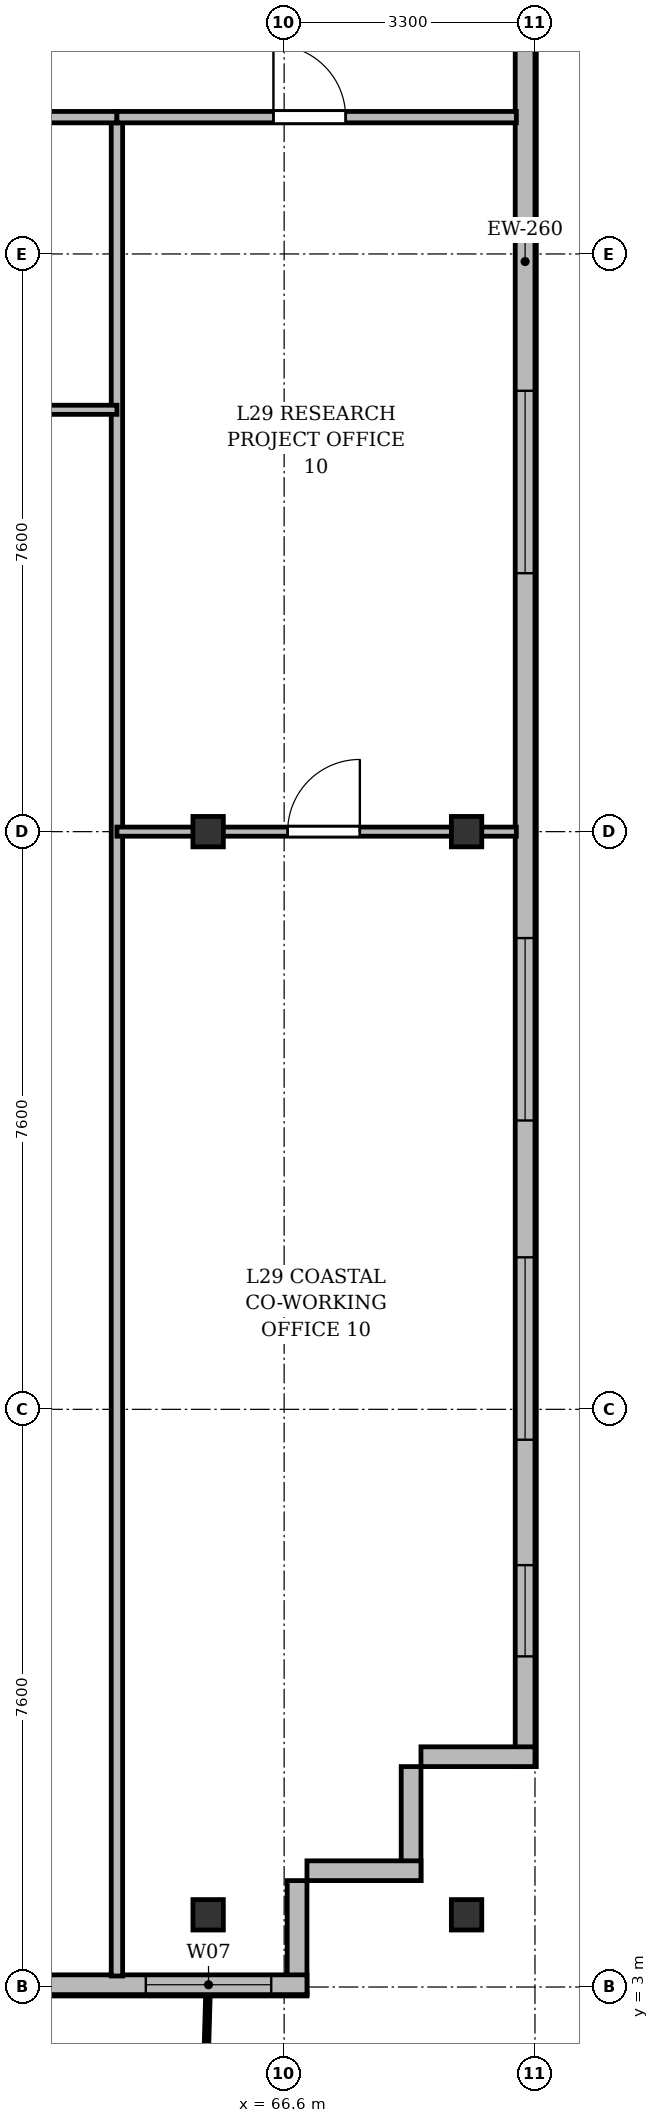
"""IFC4 building model, lengths in metres.
Left out: names, types, materials, properties, quantities, classifications, styles, units other than length and angle.
Written with IfcOpenShell. Run it as: python <this file> out.ifc"""

import sys

from ifc_helpers import new_model, si_unit, direction, frame, frame_2d, origin, origin_2d, place, context, subcontext, project, spatial, rectangle, i_section, extrude, source, transform, mapped, element, fill, save


model = new_model("IFC4")
c1 = context("Model", 3, precision=1e-05, world=origin(), true_north=direction((0.0, 1.0)))
c2 = subcontext(c1, "Body", "Model", "MODEL_VIEW")
j1 = project(units=[si_unit("LENGTHUNIT", "METRE"), si_unit("PLANEANGLEUNIT", "RADIAN")], contexts=[c1])
p1 = place(None, origin())
s1 = spatial("IfcSite", under=j1, at=p1, CompositionType="ELEMENT")
p2 = place(p1, origin())
s2 = spatial("IfcBuilding", under=s1, at=p2, CompositionType="ELEMENT")
p3 = place(p2, frame((0.0, 0.0, 114.1)))
s3 = spatial("IfcBuildingStorey", under=s2, at=p3, CompositionType="ELEMENT", Elevation=114.1)
m1 = source(origin(), c2, "Body", "SweptSolid", [
    extrude(i_section(OverallWidth=0.4, OverallDepth=0.4, WebThickness=0.022, FlangeThickness=0.035, at=origin_2d()), origin(), (0.0, 0.0, 1.0), 3.6),
])
for number, where, z_axis, x_axis in (
    (1, (65.6, 3.95, 0.0), (0.0, 0.0, 1.0), (1.0, 0.0, 0.0)),
    (2, (65.6, 18.2, 0.0), (0.0, 0.0, 1.0), (1.0, 0.0, 0.0)),
    (3, (69.0, 3.95, 0.0), (0.0, 0.0, 1.0), (1.0, 0.0, 0.0)),
    (4, (69.0, 18.2, 0.0), (0.0, 0.0, 1.0), (1.0, 0.0, 0.0)),
):
    element("IfcColumn", number, at=place(p3, frame(where, z_axis=z_axis, x_axis=x_axis)), inside=s3, PredefinedType="COLUMN", context=c2, shape_type="MappedRepresentation", body=[
        mapped(m1, transform((0.0, 0.0, 0.0), x_axis=(1.0, 0.0, 0.0), y_axis=(0.0, 1.0, 0.0), z_axis=(0.0, 0.0, 1.0), scale=1.0)),
    ])
p4 = place(p3, frame((69.77, 45.5, 0.0), z_axis=(0.0, 0.0, 1.0), x_axis=(0.0, -1.0, 0.0)))
e5 = element("IfcWall", 5, at=p4, inside=s3, PredefinedType="SOLIDWALL", context=c2, shape_type="SweptSolid", body=[
    extrude(rectangle(XDim=39.6, YDim=0.26, at=frame_2d((19.8, 0.0))), origin(), (0.0, 0.0, 1.0), 3.34),
])
p5 = place(p4, frame((36.95, 0.0, 0.92)))
e6 = element("IfcOpeningElement", 6, at=p5, cuts=e5, PredefinedType="OPENING", context=c2, shape_type="SweptSolid", body=[
    extrude(rectangle(XDim=1.2, YDim=1.65, at=frame_2d((0.6, 0.825))), frame((0.0, 0.14, 0.0), z_axis=(0.0, -1.0, 0.0), x_axis=(1.0, 0.0, 0.0)), (0.0, 0.0, 1.0), 0.28),
])
p6 = place(p4, frame((32.9, 0.0, 0.92)))
e7 = element("IfcOpeningElement", 7, at=p6, cuts=e5, PredefinedType="OPENING", context=c2, shape_type="SweptSolid", body=[
    extrude(rectangle(XDim=2.4, YDim=2.1, at=frame_2d((1.2, 1.05))), frame((0.0, 0.14, 0.0), z_axis=(0.0, -1.0, 0.0), x_axis=(1.0, 0.0, 0.0)), (0.0, 0.0, 1.0), 0.28),
])
p7 = place(p4, frame((28.7, 0.0, 0.92)))
e8 = element("IfcOpeningElement", 8, at=p7, cuts=e5, PredefinedType="OPENING", context=c2, shape_type="SweptSolid", body=[
    extrude(rectangle(XDim=2.4, YDim=2.1, at=frame_2d((1.2, 1.05))), frame((0.0, 0.14, 0.0), z_axis=(0.0, -1.0, 0.0), x_axis=(1.0, 0.0, 0.0)), (0.0, 0.0, 1.0), 0.28),
])
p8 = place(p4, frame((21.5, 0.0, 0.92)))
e9 = element("IfcOpeningElement", 9, at=p8, cuts=e5, PredefinedType="OPENING", context=c2, shape_type="SweptSolid", body=[
    extrude(rectangle(XDim=2.4, YDim=2.1, at=frame_2d((1.2, 1.05))), frame((0.0, 0.14, 0.0), z_axis=(0.0, -1.0, 0.0), x_axis=(1.0, 0.0, 0.0)), (0.0, 0.0, 1.0), 0.28),
])
p9 = place(p4, frame((7.5, 0.0, 0.92)))
e10 = element("IfcOpeningElement", 10, at=p9, cuts=e5, PredefinedType="OPENING", context=c2, shape_type="SweptSolid", body=[
    extrude(rectangle(XDim=2.4, YDim=2.1, at=frame_2d((1.2, 1.05))), frame((0.0, 0.14, 0.0), z_axis=(0.0, -1.0, 0.0), x_axis=(1.0, 0.0, 0.0)), (0.0, 0.0, 1.0), 0.28),
])
p10 = place(p4, frame((4.5, 0.0, 0.92)))
e11 = element("IfcOpeningElement", 11, at=p10, cuts=e5, PredefinedType="OPENING", context=c2, shape_type="SweptSolid", body=[
    extrude(rectangle(XDim=1.2, YDim=1.65, at=frame_2d((0.6, 0.825))), frame((0.0, 0.14, 0.0), z_axis=(0.0, -1.0, 0.0), x_axis=(1.0, 0.0, 0.0)), (0.0, 0.0, 1.0), 0.28),
])
p11 = place(p4, frame((1.15, 0.0, 0.92)))
e12 = element("IfcOpeningElement", 12, at=p11, cuts=e5, PredefinedType="OPENING", context=c2, shape_type="SweptSolid", body=[
    extrude(rectangle(XDim=1.2, YDim=1.65, at=frame_2d((0.6, 0.825))), frame((0.0, 0.14, 0.0), z_axis=(0.0, -1.0, 0.0), x_axis=(1.0, 0.0, 0.0)), (0.0, 0.0, 1.0), 0.28),
])
p12 = place(p3, frame((69.9, 6.03, 0.0), z_axis=(0.0, 0.0, 1.0), x_axis=(-1.0, 0.0, 0.0)))
e13 = element("IfcWall", 13, at=p12, inside=s3, PredefinedType="SOLIDWALL", context=c2, shape_type="SweptSolid", body=[
    extrude(rectangle(XDim=1.5, YDim=0.26, at=frame_2d((0.75, 0.0))), origin(), (0.0, 0.0, 1.0), 2.84),
])
for number, where, z_axis, x_axis in (
    (14, (68.27, 5.9, 0.0), (0.0, 0.0, 1.0), (0.0, -1.0, 0.0)),
    (15, (68.4, 4.53, 0.0), (0.0, 0.0, 1.0), (-1.0, 0.0, 0.0)),
):
    element("IfcWall", number, at=place(p3, frame(where, z_axis=z_axis, x_axis=x_axis)), inside=s3, PredefinedType="SOLIDWALL", context=c2, shape_type="SweptSolid", body=[
        extrude(rectangle(XDim=1.5, YDim=0.26, at=frame_2d((0.75, 0.0))), origin(), (0.0, 0.0, 1.0), 3.34),
    ])
p13 = place(p3, frame((66.77, 4.4, 0.0), z_axis=(0.0, 0.0, 1.0), x_axis=(0.0, -1.0, 0.0)))
e16 = element("IfcWall", 16, at=p13, inside=s3, PredefinedType="SOLIDWALL", context=c2, shape_type="SweptSolid", body=[
    extrude(rectangle(XDim=1.5, YDim=0.26, at=frame_2d((0.75, 0.0))), origin(), (0.0, 0.0, 1.0), 2.752),
])
p14 = place(p3, frame((66.9, 3.03, 0.0), z_axis=(0.0, 0.0, 1.0), x_axis=(-1.0, 0.0, 0.0)))
e17 = element("IfcWall", 17, at=p14, inside=s3, PredefinedType="SOLIDWALL", context=c2, shape_type="SweptSolid", body=[
    extrude(rectangle(XDim=59.4, YDim=0.26, at=frame_2d((29.7, 0.0))), origin(), (0.0, 0.0, 1.0), 3.34),
])
p15 = place(p14, frame((0.47, 0.0, 0.9)))
e18 = element("IfcOpeningElement", 18, at=p15, cuts=e17, PredefinedType="OPENING", context=c2, shape_type="SweptSolid", body=[
    extrude(rectangle(XDim=1.65, YDim=1.85, at=frame_2d((0.825, 0.925))), frame((0.0, 0.14, 0.0), z_axis=(0.0, -1.0, 0.0), x_axis=(1.0, 0.0, 0.0)), (0.0, 0.0, 1.0), 0.28),
])
p16 = place(p14, frame((4.4, 0.0, 0.9)))
e19 = element("IfcOpeningElement", 19, at=p16, cuts=e17, PredefinedType="OPENING", context=c2, shape_type="SweptSolid", body=[
    extrude(rectangle(XDim=1.8, YDim=1.8, at=frame_2d((0.9, 0.9))), frame((0.0, 0.14, 0.0), z_axis=(0.0, -1.0, 0.0), x_axis=(1.0, 0.0, 0.0)), (0.0, 0.0, 1.0), 0.28),
])
p17 = place(p14, frame((10.9, 0.0, 0.9)))
e20 = element("IfcOpeningElement", 20, at=p17, cuts=e17, PredefinedType="OPENING", context=c2, shape_type="SweptSolid", body=[
    extrude(rectangle(XDim=2.2, YDim=1.8, at=frame_2d((1.1, 0.9))), frame((0.0, 0.14, 0.0), z_axis=(0.0, -1.0, 0.0), x_axis=(1.0, 0.0, 0.0)), (0.0, 0.0, 1.0), 0.28),
])
p18 = place(p14, frame((16.92, 0.0, 0.0)))
e21 = element("IfcOpeningElement", 21, at=p18, cuts=e17, PredefinedType="OPENING", context=c2, shape_type="SweptSolid", body=[
    extrude(rectangle(XDim=1.2, YDim=2.2, at=frame_2d((0.6, 1.1))), frame((0.0, 0.14, 0.0), z_axis=(0.0, -1.0, 0.0), x_axis=(1.0, 0.0, 0.0)), (0.0, 0.0, 1.0), 0.28),
])
p19 = place(p14, frame((18.75, 0.0, 0.9)))
e22 = element("IfcOpeningElement", 22, at=p19, cuts=e17, PredefinedType="OPENING", context=c2, shape_type="SweptSolid", body=[
    extrude(rectangle(XDim=1.5, YDim=1.75, at=frame_2d((0.75, 0.875))), frame((0.0, 0.14, 0.0), z_axis=(0.0, -1.0, 0.0), x_axis=(1.0, 0.0, 0.0)), (0.0, 0.0, 1.0), 0.28),
])
p20 = place(p14, frame((21.075, 0.0, 0.9)))
e23 = element("IfcOpeningElement", 23, at=p20, cuts=e17, PredefinedType="OPENING", context=c2, shape_type="SweptSolid", body=[
    extrude(rectangle(XDim=1.65, YDim=1.85, at=frame_2d((0.825, 0.925))), frame((0.0, 0.14, 0.0), z_axis=(0.0, -1.0, 0.0), x_axis=(1.0, 0.0, 0.0)), (0.0, 0.0, 1.0), 0.28),
])
p21 = place(p14, frame((26.5, 0.0, 0.9)))
e24 = element("IfcOpeningElement", 24, at=p21, cuts=e17, PredefinedType="OPENING", context=c2, shape_type="SweptSolid", body=[
    extrude(rectangle(XDim=1.8, YDim=1.8, at=frame_2d((0.9, 0.9))), frame((0.0, 0.14, 0.0), z_axis=(0.0, -1.0, 0.0), x_axis=(1.0, 0.0, 0.0)), (0.0, 0.0, 1.0), 0.28),
])
p22 = place(p14, frame((32.45, 0.0, 0.9)))
e25 = element("IfcOpeningElement", 25, at=p22, cuts=e17, PredefinedType="OPENING", context=c2, shape_type="SweptSolid", body=[
    extrude(rectangle(XDim=2.2, YDim=1.8, at=frame_2d((1.1, 0.9))), frame((0.0, 0.14, 0.0), z_axis=(0.0, -1.0, 0.0), x_axis=(1.0, 0.0, 0.0)), (0.0, 0.0, 1.0), 0.28),
])
p23 = place(p14, frame((36.5, 0.0, 0.9)))
e26 = element("IfcOpeningElement", 26, at=p23, cuts=e17, PredefinedType="OPENING", context=c2, shape_type="SweptSolid", body=[
    extrude(rectangle(XDim=1.5, YDim=1.75, at=frame_2d((0.75, 0.875))), frame((0.0, 0.14, 0.0), z_axis=(0.0, -1.0, 0.0), x_axis=(1.0, 0.0, 0.0)), (0.0, 0.0, 1.0), 0.28),
])
p24 = place(p14, frame((39.6, 0.0, 0.9)))
e27 = element("IfcOpeningElement", 27, at=p24, cuts=e17, PredefinedType="OPENING", context=c2, shape_type="SweptSolid", body=[
    extrude(rectangle(XDim=2.0, YDim=1.95, at=frame_2d((1.0, 0.975))), frame((0.0, 0.14, 0.0), z_axis=(0.0, -1.0, 0.0), x_axis=(1.0, 0.0, 0.0)), (0.0, 0.0, 1.0), 0.28),
])
p25 = place(p14, frame((42.775, 0.0, 0.9)))
e28 = element("IfcOpeningElement", 28, at=p25, cuts=e17, PredefinedType="OPENING", context=c2, shape_type="SweptSolid", body=[
    extrude(rectangle(XDim=1.65, YDim=1.85, at=frame_2d((0.825, 0.925))), frame((0.0, 0.14, 0.0), z_axis=(0.0, -1.0, 0.0), x_axis=(1.0, 0.0, 0.0)), (0.0, 0.0, 1.0), 0.28),
])
p26 = place(p14, frame((46.435, 0.0, 0.0)))
e29 = element("IfcOpeningElement", 29, at=p26, cuts=e17, PredefinedType="OPENING", context=c2, shape_type="SweptSolid", body=[
    extrude(rectangle(XDim=1.2, YDim=2.2, at=frame_2d((0.6, 1.1))), frame((0.0, 0.14, 0.0), z_axis=(0.0, -1.0, 0.0), x_axis=(1.0, 0.0, 0.0)), (0.0, 0.0, 1.0), 0.28),
])
p27 = place(p14, frame((48.65, 0.0, 0.9)))
e30 = element("IfcOpeningElement", 30, at=p27, cuts=e17, PredefinedType="OPENING", context=c2, shape_type="SweptSolid", body=[
    extrude(rectangle(XDim=2.2, YDim=1.8, at=frame_2d((1.1, 0.9))), frame((0.0, 0.14, 0.0), z_axis=(0.0, -1.0, 0.0), x_axis=(1.0, 0.0, 0.0)), (0.0, 0.0, 1.0), 0.28),
])
p28 = place(p14, frame((53.25, 0.0, 0.9)))
e31 = element("IfcOpeningElement", 31, at=p28, cuts=e17, PredefinedType="OPENING", context=c2, shape_type="SweptSolid", body=[
    extrude(rectangle(XDim=1.5, YDim=1.75, at=frame_2d((0.75, 0.875))), frame((0.0, 0.14, 0.0), z_axis=(0.0, -1.0, 0.0), x_axis=(1.0, 0.0, 0.0)), (0.0, 0.0, 1.0), 0.28),
])
p29 = place(p14, frame((57.005, 0.0, 0.9)))
e32 = element("IfcOpeningElement", 32, at=p29, cuts=e17, PredefinedType="OPENING", context=c2, shape_type="SweptSolid", body=[
    extrude(rectangle(XDim=2.0, YDim=1.95, at=frame_2d((1.0, 0.975))), frame((0.0, 0.14, 0.0), z_axis=(0.0, -1.0, 0.0), x_axis=(1.0, 0.0, 0.0)), (0.0, 0.0, 1.0), 0.28),
])
p30 = place(p3, frame((64.4, 3.145, 0.0), z_axis=(0.0, 0.0, 1.0), x_axis=(0.0, 1.0, 0.0)))
e33 = element("IfcWall", 33, at=p30, inside=s3, PredefinedType="PARTITIONING", context=c2, shape_type="SweptSolid", body=[
    extrude(rectangle(XDim=24.455, YDim=0.15, at=frame_2d((12.228, 0.0))), origin(), (0.0, 0.0, 1.0), 2.752),
])
p31 = place(p3, frame((58.8, 27.6, 0.0), z_axis=(0.0, 0.0, 1.0), x_axis=(1.0, 0.0, 0.0)))
e34 = element("IfcWall", 34, at=p31, inside=s3, PredefinedType="PARTITIONING", context=c2, shape_type="SweptSolid", body=[
    extrude(rectangle(XDim=5.6, YDim=0.15, at=frame_2d((2.8, 0.0))), origin(), (0.0, 0.0, 1.0), 2.84),
])
p32 = place(p31, frame((2.232, 0.0, 0.0)))
e35 = element("IfcOpeningElement", 35, at=p32, cuts=e34, PredefinedType="OPENING", context=c2, shape_type="SweptSolid", body=[
    extrude(rectangle(XDim=0.95, YDim=2.15, at=frame_2d((0.475, 1.075))), frame((0.0, 0.085, 0.0), z_axis=(0.0, -1.0, 0.0), x_axis=(1.0, 0.0, 0.0)), (0.0, 0.0, 1.0), 0.17),
])
p33 = place(p3, frame((58.8, 23.75, 0.0), z_axis=(0.0, 0.0, 1.0), x_axis=(1.0, 0.0, 0.0)))
e36 = element("IfcWall", 36, at=p33, inside=s3, PredefinedType="PARTITIONING", context=c2, shape_type="SweptSolid", body=[
    extrude(rectangle(XDim=5.6, YDim=0.12, at=frame_2d((2.8, 0.0))), origin(), (0.0, 0.0, 1.0), 2.84),
])
p34 = place(p33, frame((2.232, 0.0, 0.0)))
e37 = element("IfcOpeningElement", 37, at=p34, cuts=e36, PredefinedType="OPENING", context=c2, shape_type="SweptSolid", body=[
    extrude(rectangle(XDim=0.95, YDim=2.15, at=frame_2d((0.475, 1.075))), frame((0.0, 0.07, 0.0), z_axis=(0.0, -1.0, 0.0), x_axis=(1.0, 0.0, 0.0)), (0.0, 0.0, 1.0), 0.14),
])
p35 = place(p3, frame((64.4, 27.6, 0.0), z_axis=(0.0, 0.0, 1.0), x_axis=(1.0, 0.0, 0.0)))
e38 = element("IfcWall", 38, at=p35, inside=s3, PredefinedType="PARTITIONING", context=c2, shape_type="SweptSolid", body=[
    extrude(rectangle(XDim=5.255, YDim=0.15, at=frame_2d((2.627, 0.0))), origin(), (0.0, 0.0, 1.0), 2.84),
])
p36 = place(p35, frame((2.059, 0.0, 0.0)))
e39 = element("IfcOpeningElement", 39, at=p36, cuts=e38, PredefinedType="OPENING", context=c2, shape_type="SweptSolid", body=[
    extrude(rectangle(XDim=0.95, YDim=2.15, at=frame_2d((0.475, 1.075))), frame((0.0, 0.085, 0.0), z_axis=(0.0, -1.0, 0.0), x_axis=(1.0, 0.0, 0.0)), (0.0, 0.0, 1.0), 0.17),
])
p37 = place(p3, frame((64.4, 18.2, 0.0), z_axis=(0.0, 0.0, 1.0), x_axis=(1.0, 0.0, 0.0)))
e40 = element("IfcWall", 40, at=p37, inside=s3, PredefinedType="PARTITIONING", context=c2, shape_type="SweptSolid", body=[
    extrude(rectangle(XDim=5.255, YDim=0.12, at=frame_2d((2.627, 0.0))), origin(), (0.0, 0.0, 1.0), 2.752),
])
p38 = place(p37, frame((2.246, 0.0, 0.0)))
e41 = element("IfcOpeningElement", 41, at=p38, cuts=e40, PredefinedType="OPENING", context=c2, shape_type="SweptSolid", body=[
    extrude(rectangle(XDim=0.95, YDim=2.15, at=frame_2d((0.475, 1.075))), frame((0.0, 0.07, 0.0), z_axis=(0.0, -1.0, 0.0), x_axis=(1.0, 0.0, 0.0)), (0.0, 0.0, 1.0), 0.14),
])
m2 = source(origin(), c2, "Body", "SweptSolid", [
    extrude(rectangle(XDim=1.2, YDim=1.65, at=frame_2d((0.6, 0.825))), frame((0.0, 0.03, 0.0), z_axis=(0.0, -1.0, 0.0), x_axis=(1.0, 0.0, 0.0)), (0.0, 0.0, 1.0), 0.06),
])
p39 = place(p5, origin())
e42 = element("IfcWindow", 42, at=p39, inside=s3, PartitioningType="SINGLE_PANEL", PredefinedType="WINDOW", context=c2, shape_type="MappedRepresentation", body=[
    mapped(m2, transform((0.0, 0.0, 0.0), x_axis=(1.0, 0.0, 0.0), y_axis=(0.0, 1.0, 0.0), z_axis=(0.0, 0.0, 1.0), scale=1.0)),
])
fill(e6, e42)
m3 = source(origin(), c2, "Body", "SweptSolid", [
    extrude(rectangle(XDim=2.4, YDim=2.1, at=frame_2d((1.2, 1.05))), frame((0.0, 0.03, 0.0), z_axis=(0.0, -1.0, 0.0), x_axis=(1.0, 0.0, 0.0)), (0.0, 0.0, 1.0), 0.06),
])
p40 = place(p6, origin())
e43 = element("IfcWindow", 43, at=p40, inside=s3, PartitioningType="SINGLE_PANEL", PredefinedType="WINDOW", context=c2, shape_type="MappedRepresentation", body=[
    mapped(m3, transform((0.0, 0.0, 0.0), x_axis=(1.0, 0.0, 0.0), y_axis=(0.0, 1.0, 0.0), z_axis=(0.0, 0.0, 1.0), scale=1.0)),
])
fill(e7, e43)
p41 = place(p7, origin())
e44 = element("IfcWindow", 44, at=p41, inside=s3, PartitioningType="SINGLE_PANEL", PredefinedType="WINDOW", context=c2, shape_type="MappedRepresentation", body=[
    mapped(m3, transform((0.0, 0.0, 0.0), x_axis=(1.0, 0.0, 0.0), y_axis=(0.0, 1.0, 0.0), z_axis=(0.0, 0.0, 1.0), scale=1.0)),
])
fill(e8, e44)
p42 = place(p8, origin())
e45 = element("IfcWindow", 45, at=p42, inside=s3, PartitioningType="SINGLE_PANEL", PredefinedType="WINDOW", context=c2, shape_type="MappedRepresentation", body=[
    mapped(m3, transform((0.0, 0.0, 0.0), x_axis=(1.0, 0.0, 0.0), y_axis=(0.0, 1.0, 0.0), z_axis=(0.0, 0.0, 1.0), scale=1.0)),
])
fill(e9, e45)
m4 = source(origin(), c2, "Body", "SweptSolid", [
    extrude(rectangle(XDim=1.65, YDim=1.85, at=frame_2d((0.825, 0.925))), frame((0.0, 0.03, 0.0), z_axis=(0.0, -1.0, 0.0), x_axis=(1.0, 0.0, 0.0)), (0.0, 0.0, 1.0), 0.06),
])
p43 = place(p15, origin())
e46 = element("IfcWindow", 46, at=p43, inside=s3, PartitioningType="SINGLE_PANEL", PredefinedType="WINDOW", context=c2, shape_type="MappedRepresentation", body=[
    mapped(m4, transform((0.0, 0.0, 0.0), x_axis=(1.0, 0.0, 0.0), y_axis=(0.0, 1.0, 0.0), z_axis=(0.0, 0.0, 1.0), scale=1.0)),
])
fill(e18, e46)
m5 = source(origin(), c2, "Body", "SweptSolid", [
    extrude(rectangle(XDim=0.95, YDim=2.15, at=frame_2d((0.475, 1.075))), frame((0.0, 0.025, 0.0), z_axis=(0.0, -1.0, 0.0), x_axis=(1.0, 0.0, 0.0)), (0.0, 0.0, 1.0), 0.05),
])
p44 = place(p36, origin())
e47 = element("IfcDoor", 47, at=p44, inside=s3, OperationType="SINGLE_SWING_LEFT", PredefinedType="DOOR", context=c2, shape_type="MappedRepresentation", body=[
    mapped(m5, transform((0.0, 0.0, 0.0), x_axis=(1.0, 0.0, 0.0), y_axis=(0.0, 1.0, 0.0), z_axis=(0.0, 0.0, 1.0), scale=1.0)),
])
fill(e39, e47)
p45 = place(p38, origin())
e48 = element("IfcDoor", 48, at=p45, inside=s3, OperationType="SINGLE_SWING_RIGHT", PredefinedType="DOOR", context=c2, shape_type="MappedRepresentation", body=[
    mapped(m5, transform((0.0, 0.0, 0.0), x_axis=(1.0, 0.0, 0.0), y_axis=(0.0, 1.0, 0.0), z_axis=(0.0, 0.0, 1.0), scale=1.0)),
])
fill(e41, e48)
save(model, sys.argv[1])
